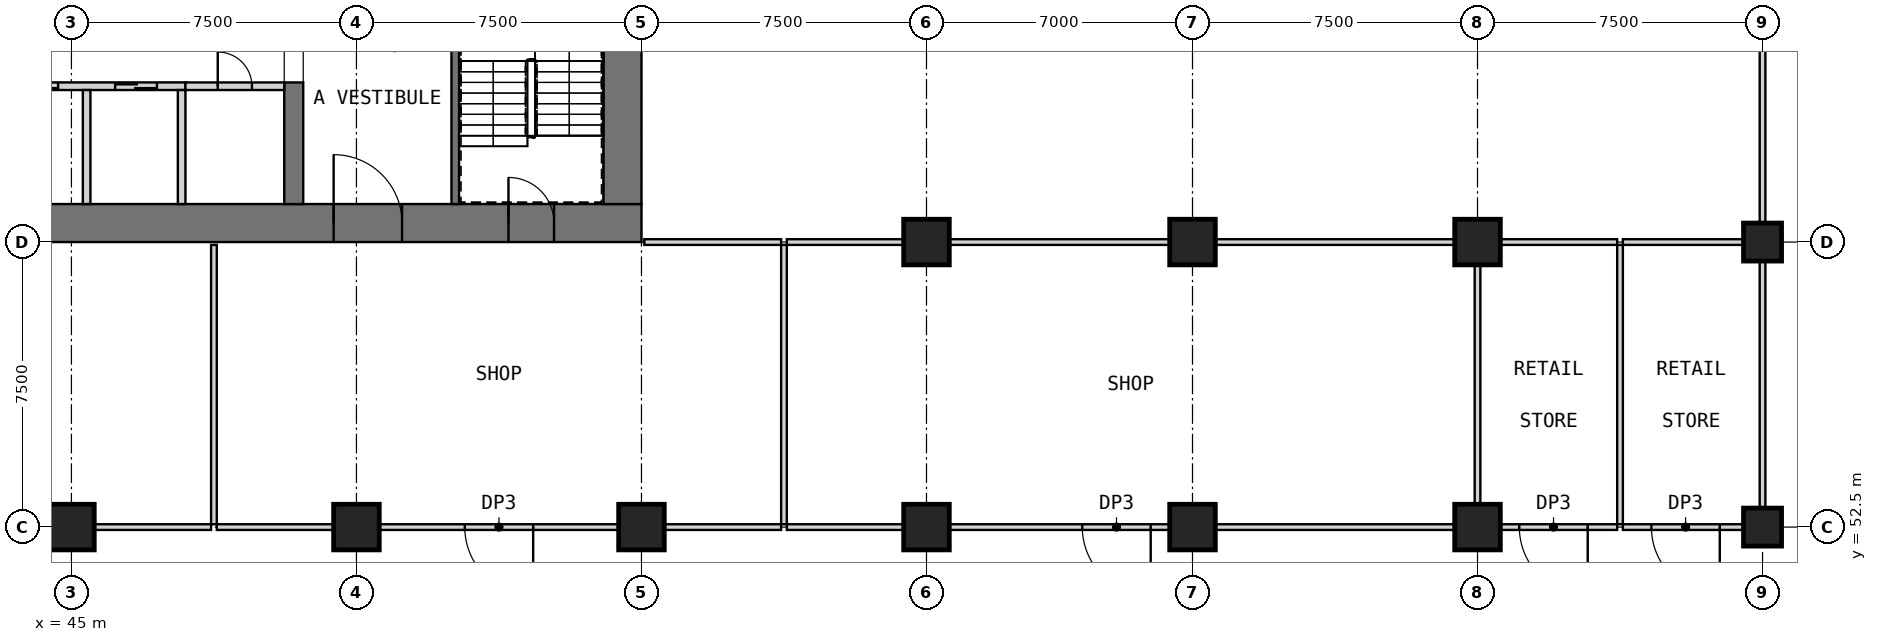
"""IFC4 building model, lengths in metres.
Left out: names, types, materials, properties, quantities, classifications, styles, units other than length and angle.
Written with IfcOpenShell. Run it as: python <this file> out.ifc"""

import sys

from ifc_helpers import new_model, si_unit, direction, frame, frame_2d, origin, origin_2d, place, context, subcontext, project, spatial, rectangle, extrude, element, fill, save


model = new_model("IFC4")
c1 = context("Model", 3, precision=1e-05, world=origin(), true_north=direction((0.0, 1.0)))
c2 = subcontext(c1, "Body", "Model", "MODEL_VIEW")
j1 = project(units=[si_unit("LENGTHUNIT", "METRE"), si_unit("PLANEANGLEUNIT", "RADIAN")], contexts=[c1])
p1 = place(None, origin())
s1 = spatial("IfcSite", under=j1, at=p1, CompositionType="ELEMENT")
p2 = place(p1, origin())
s2 = spatial("IfcBuilding", under=s1, at=p2, CompositionType="ELEMENT")
p3 = place(p2, frame((0.0, 0.0, 8.0)))
s3 = spatial("IfcBuildingStorey", under=s2, at=p3, CompositionType="ELEMENT", Elevation=8.0)
for number, where, z_axis, x_axis in (
    (1, (45.0, 52.5, 0.0), (0.0, 0.0, 1.0), (1.0, 0.0, 0.0)),
    (2, (52.5, 52.5, 0.0), (0.0, 0.0, 1.0), (1.0, 0.0, 0.0)),
    (3, (60.0, 52.5, 0.0), (0.0, 0.0, 1.0), (1.0, 0.0, 0.0)),
    (4, (67.5, 52.5, 0.0), (0.0, 0.0, 1.0), (1.0, 0.0, 0.0)),
    (5, (67.5, 60.0, 0.0), (0.0, 0.0, 1.0), (1.0, 0.0, 0.0)),
    (6, (74.5, 52.5, 0.0), (0.0, 0.0, 1.0), (1.0, 0.0, 0.0)),
    (7, (74.5, 60.0, 0.0), (0.0, 0.0, 1.0), (1.0, 0.0, 0.0)),
    (8, (82.0, 52.5, 0.0), (0.0, 0.0, 1.0), (1.0, 0.0, 0.0)),
    (9, (82.0, 60.0, 0.0), (0.0, 0.0, 1.0), (1.0, 0.0, 0.0)),
):
    element("IfcColumn", number, at=place(p3, frame(where, z_axis=z_axis, x_axis=x_axis)), inside=s3, PredefinedType="COLUMN", context=c2, shape_type="SweptSolid", body=[
        extrude(rectangle(XDim=1.2, YDim=1.2, at=origin_2d()), origin(), (0.0, 0.0, 1.0), 5.5),
    ])
for number, where, z_axis, x_axis in (
    (10, (89.5, 52.5, 0.0), (0.0, 0.0, 1.0), (1.0, 0.0, 0.0)),
    (11, (89.5, 60.0, 0.0), (0.0, 0.0, 1.0), (1.0, 0.0, 0.0)),
):
    element("IfcColumn", number, at=place(p3, frame(where, z_axis=z_axis, x_axis=x_axis)), inside=s3, PredefinedType="COLUMN", context=c2, shape_type="SweptSolid", body=[
        extrude(rectangle(XDim=1.0, YDim=1.0, at=origin_2d()), origin(), (0.0, 0.0, 1.0), 5.5),
    ])
p4 = place(p3, frame((30.0, 60.5, 0.0), z_axis=(0.0, 0.0, 1.0), x_axis=(1.0, 0.0, 0.0)))
e12 = element("IfcWall", 12, at=p4, inside=s3, PredefinedType="SHEAR", context=c2, shape_type="SweptSolid", body=[
    extrude(rectangle(XDim=30.0, YDim=1.0, at=frame_2d((15.0, 0.0))), origin(), (0.0, 0.0, 1.0), 5.5),
])
p5 = place(p4, frame((21.9, 0.0, 0.0)))
e13 = element("IfcOpeningElement", 13, at=p5, cuts=e12, PredefinedType="OPENING", context=c2, shape_type="SweptSolid", body=[
    extrude(rectangle(XDim=1.8, YDim=2.1, at=frame_2d((0.9, 1.05))), frame((0.0, 0.51, 0.0), z_axis=(0.0, -1.0, 0.0), x_axis=(1.0, 0.0, 0.0)), (0.0, 0.0, 1.0), 1.02),
])
p6 = place(p4, frame((26.5, 0.0, 0.0)))
e14 = element("IfcOpeningElement", 14, at=p6, cuts=e12, PredefinedType="OPENING", context=c2, shape_type="SweptSolid", body=[
    extrude(rectangle(XDim=1.2, YDim=2.1, at=frame_2d((0.6, 1.05))), frame((0.0, 0.51, 0.0), z_axis=(0.0, -1.0, 0.0), x_axis=(1.0, 0.0, 0.0)), (0.0, 0.0, 1.0), 1.02),
])
p7 = place(p3, frame((59.5, 61.0, 0.0), z_axis=(0.0, 0.0, 1.0), x_axis=(0.0, 1.0, 0.0)))
e15 = element("IfcWall", 15, at=p7, inside=s3, PredefinedType="SHEAR", context=c2, shape_type="SweptSolid", body=[
    extrude(rectangle(XDim=20.5, YDim=1.0, at=frame_2d((10.25, 0.0))), origin(), (0.0, 0.0, 1.0), 5.5),
])
p8 = place(p7, frame((14.5, 0.0, 0.0)))
e16 = element("IfcOpeningElement", 16, at=p8, cuts=e15, PredefinedType="OPENING", context=c2, shape_type="SweptSolid", body=[
    extrude(rectangle(XDim=1.8, YDim=2.1, at=frame_2d((0.9, 1.05))), frame((0.0, 0.51, 0.0), z_axis=(0.0, -1.0, 0.0), x_axis=(1.0, 0.0, 0.0)), (0.0, 0.0, 1.0), 1.02),
])
p9 = place(p3, frame((50.85, 61.0, 0.0), z_axis=(0.0, 0.0, 1.0), x_axis=(0.0, 1.0, 0.0)))
e17 = element("IfcWall", 17, at=p9, inside=s3, PredefinedType="SHEAR", context=c2, shape_type="SweptSolid", body=[
    extrude(rectangle(XDim=3.2, YDim=0.5, at=frame_2d((1.6, 0.0))), origin(), (0.0, 0.0, 1.0), 5.5),
])
p10 = place(p3, frame((35.0, 64.1, 0.0), z_axis=(0.0, 0.0, 1.0), x_axis=(1.0, 0.0, 0.0)))
e18 = element("IfcWall", 18, at=p10, inside=s3, PredefinedType="SOLIDWALL", context=c2, shape_type="SweptSolid", body=[
    extrude(rectangle(XDim=13.0, YDim=0.2, at=frame_2d((6.5, 0.0))), origin(), (0.0, 0.0, 1.0), 5.5),
])
p11 = place(p10, frame((0.75, 0.0, 0.0)))
e19 = element("IfcOpeningElement", 19, at=p11, cuts=e18, PredefinedType="OPENING", context=c2, shape_type="SweptSolid", body=[
    extrude(rectangle(XDim=1.1, YDim=2.1, at=frame_2d((0.55, 1.05))), frame((0.0, 0.11, 0.0), z_axis=(0.0, -1.0, 0.0), x_axis=(1.0, 0.0, 0.0)), (0.0, 0.0, 1.0), 0.22),
])
p12 = place(p10, frame((3.35, 0.0, 0.0)))
e20 = element("IfcOpeningElement", 20, at=p12, cuts=e18, PredefinedType="OPENING", context=c2, shape_type="SweptSolid", body=[
    extrude(rectangle(XDim=1.1, YDim=2.1, at=frame_2d((0.55, 1.05))), frame((0.0, 0.11, 0.0), z_axis=(0.0, -1.0, 0.0), x_axis=(1.0, 0.0, 0.0)), (0.0, 0.0, 1.0), 0.22),
])
p13 = place(p10, frame((5.95, 0.0, 0.0)))
e21 = element("IfcOpeningElement", 21, at=p13, cuts=e18, PredefinedType="OPENING", context=c2, shape_type="SweptSolid", body=[
    extrude(rectangle(XDim=1.1, YDim=2.1, at=frame_2d((0.55, 1.05))), frame((0.0, 0.11, 0.0), z_axis=(0.0, -1.0, 0.0), x_axis=(1.0, 0.0, 0.0)), (0.0, 0.0, 1.0), 0.22),
])
p14 = place(p10, frame((8.55, 0.0, 0.0)))
e22 = element("IfcOpeningElement", 22, at=p14, cuts=e18, PredefinedType="OPENING", context=c2, shape_type="SweptSolid", body=[
    extrude(rectangle(XDim=1.1, YDim=2.1, at=frame_2d((0.55, 1.05))), frame((0.0, 0.11, 0.0), z_axis=(0.0, -1.0, 0.0), x_axis=(1.0, 0.0, 0.0)), (0.0, 0.0, 1.0), 0.22),
])
p15 = place(p10, frame((11.15, 0.0, 0.0)))
e23 = element("IfcOpeningElement", 23, at=p15, cuts=e18, PredefinedType="OPENING", context=c2, shape_type="SweptSolid", body=[
    extrude(rectangle(XDim=1.1, YDim=2.1, at=frame_2d((0.55, 1.05))), frame((0.0, 0.11, 0.0), z_axis=(0.0, -1.0, 0.0), x_axis=(1.0, 0.0, 0.0)), (0.0, 0.0, 1.0), 0.22),
])
for number, where, z_axis, x_axis in (
    (24, (45.4, 61.0, 0.0), (0.0, 0.0, 1.0), (0.0, 1.0, 0.0)),
    (25, (47.9, 61.0, 0.0), (0.0, 0.0, 1.0), (0.0, 1.0, 0.0)),
):
    element("IfcWall", number, at=place(p3, frame(where, z_axis=z_axis, x_axis=x_axis)), inside=s3, PredefinedType="SOLIDWALL", context=c2, shape_type="SweptSolid", body=[
        extrude(rectangle(XDim=3.0, YDim=0.2, at=frame_2d((1.5, 0.0))), origin(), (0.0, 0.0, 1.0), 5.5),
    ])
p16 = place(p3, frame((48.0, 64.1, 0.0), z_axis=(0.0, 0.0, 1.0), x_axis=(1.0, 0.0, 0.0)))
e26 = element("IfcWall", 26, at=p16, inside=s3, PredefinedType="PARTITIONING", context=c2, shape_type="SweptSolid", body=[
    extrude(rectangle(XDim=2.6, YDim=0.2, at=frame_2d((1.3, 0.0))), origin(), (0.0, 0.0, 1.0), 5.2),
])
p17 = place(p16, frame((0.85, 0.0, 0.0)))
e27 = element("IfcOpeningElement", 27, at=p17, cuts=e26, PredefinedType="OPENING", context=c2, shape_type="SweptSolid", body=[
    extrude(rectangle(XDim=0.9, YDim=2.1, at=frame_2d((0.45, 1.05))), frame((0.0, 0.11, 0.0), z_axis=(0.0, -1.0, 0.0), x_axis=(1.0, 0.0, 0.0)), (0.0, 0.0, 1.0), 0.22),
])
p18 = place(p3, frame((55.1, 61.0, 0.0), z_axis=(0.0, 0.0, 1.0), x_axis=(0.0, 1.0, 0.0)))
e28 = element("IfcWall", 28, at=p18, inside=s3, PredefinedType="SOLIDWALL", context=c2, shape_type="SweptSolid", body=[
    extrude(rectangle(XDim=7.6, YDim=0.2, at=frame_2d((3.8, 0.0))), origin(), (0.0, 0.0, 1.0), 5.2),
])
for number, where, z_axis, x_axis in (
    (29, (45.6, 52.5, 0.0), (0.0, 0.0, 1.0), (1.0, 0.0, 0.0)),
    (30, (48.825, 52.5, 0.0), (0.0, 0.0, 1.0), (1.0, 0.0, 0.0)),
):
    element("IfcWall", number, at=place(p3, frame(where, z_axis=z_axis, x_axis=x_axis)), inside=s3, PredefinedType="PARTITIONING", context=c2, shape_type="SweptSolid", body=[
        extrude(rectangle(XDim=3.075, YDim=0.15, at=frame_2d((1.538, 0.0))), origin(), (0.0, 0.0, 1.0), 5.2),
    ])
p19 = place(p3, frame((59.4, 52.5, 0.0), z_axis=(0.0, 0.0, 1.0), x_axis=(-1.0, 0.0, 0.0)))
e31 = element("IfcWall", 31, at=p19, inside=s3, PredefinedType="PARTITIONING", context=c2, shape_type="SweptSolid", body=[
    extrude(rectangle(XDim=6.3, YDim=0.15, at=frame_2d((3.15, 0.0))), origin(), (0.0, 0.0, 1.0), 5.2),
])
p20 = place(p19, frame((2.25, 0.0, 0.0)))
e32 = element("IfcOpeningElement", 32, at=p20, cuts=e31, PredefinedType="OPENING", context=c2, shape_type="SweptSolid", body=[
    extrude(rectangle(XDim=1.8, YDim=2.4, at=frame_2d((0.9, 1.2))), frame((0.0, 0.085, 0.0), z_axis=(0.0, -1.0, 0.0), x_axis=(1.0, 0.0, 0.0)), (0.0, 0.0, 1.0), 0.17),
])
for number, where, z_axis, x_axis in (
    (33, (60.6, 52.5, 0.0), (0.0, 0.0, 1.0), (1.0, 0.0, 0.0)),
    (34, (63.825, 52.5, 0.0), (0.0, 0.0, 1.0), (1.0, 0.0, 0.0)),
):
    element("IfcWall", number, at=place(p3, frame(where, z_axis=z_axis, x_axis=x_axis)), inside=s3, PredefinedType="PARTITIONING", context=c2, shape_type="SweptSolid", body=[
        extrude(rectangle(XDim=3.075, YDim=0.15, at=frame_2d((1.538, 0.0))), origin(), (0.0, 0.0, 1.0), 5.2),
    ])
p21 = place(p3, frame((73.9, 52.5, 0.0), z_axis=(0.0, 0.0, 1.0), x_axis=(-1.0, 0.0, 0.0)))
e35 = element("IfcWall", 35, at=p21, inside=s3, PredefinedType="PARTITIONING", context=c2, shape_type="SweptSolid", body=[
    extrude(rectangle(XDim=5.8, YDim=0.15, at=frame_2d((2.9, 0.0))), origin(), (0.0, 0.0, 1.0), 5.2),
])
p22 = place(p21, frame((0.5, 0.0, 0.0)))
e36 = element("IfcOpeningElement", 36, at=p22, cuts=e35, PredefinedType="OPENING", context=c2, shape_type="SweptSolid", body=[
    extrude(rectangle(XDim=1.8, YDim=2.4, at=frame_2d((0.9, 1.2))), frame((0.0, 0.085, 0.0), z_axis=(0.0, -1.0, 0.0), x_axis=(1.0, 0.0, 0.0)), (0.0, 0.0, 1.0), 0.17),
])
p23 = place(p3, frame((75.1, 52.5, 0.0), z_axis=(0.0, 0.0, 1.0), x_axis=(1.0, 0.0, 0.0)))
e37 = element("IfcWall", 37, at=p23, inside=s3, PredefinedType="PARTITIONING", context=c2, shape_type="SweptSolid", body=[
    extrude(rectangle(XDim=6.3, YDim=0.15, at=frame_2d((3.15, 0.0))), origin(), (0.0, 0.0, 1.0), 5.2),
])
p24 = place(p3, frame((85.675, 52.5, 0.0), z_axis=(0.0, 0.0, 1.0), x_axis=(-1.0, 0.0, 0.0)))
e38 = element("IfcWall", 38, at=p24, inside=s3, PredefinedType="PARTITIONING", context=c2, shape_type="SweptSolid", body=[
    extrude(rectangle(XDim=3.075, YDim=0.15, at=frame_2d((1.538, 0.0))), origin(), (0.0, 0.0, 1.0), 5.2),
])
p25 = place(p24, frame((0.775, 0.0, 0.0)))
e39 = element("IfcOpeningElement", 39, at=p25, cuts=e38, PredefinedType="OPENING", context=c2, shape_type="SweptSolid", body=[
    extrude(rectangle(XDim=1.8, YDim=2.4, at=frame_2d((0.9, 1.2))), frame((0.0, 0.085, 0.0), z_axis=(0.0, -1.0, 0.0), x_axis=(1.0, 0.0, 0.0)), (0.0, 0.0, 1.0), 0.17),
])
p26 = place(p3, frame((89.0, 52.5, 0.0), z_axis=(0.0, 0.0, 1.0), x_axis=(-1.0, 0.0, 0.0)))
e40 = element("IfcWall", 40, at=p26, inside=s3, PredefinedType="PARTITIONING", context=c2, shape_type="SweptSolid", body=[
    extrude(rectangle(XDim=3.175, YDim=0.15, at=frame_2d((1.587, 0.0))), origin(), (0.0, 0.0, 1.0), 5.2),
])
p27 = place(p26, frame((0.625, 0.0, 0.0)))
e41 = element("IfcOpeningElement", 41, at=p27, cuts=e40, PredefinedType="OPENING", context=c2, shape_type="SweptSolid", body=[
    extrude(rectangle(XDim=1.8, YDim=2.4, at=frame_2d((0.9, 1.2))), frame((0.0, 0.085, 0.0), z_axis=(0.0, -1.0, 0.0), x_axis=(1.0, 0.0, 0.0)), (0.0, 0.0, 1.0), 0.17),
])
p28 = place(p3, frame((60.075, 60.0, 0.0), z_axis=(0.0, 0.0, 1.0), x_axis=(1.0, 0.0, 0.0)))
e42 = element("IfcWall", 42, at=p28, inside=s3, PredefinedType="PARTITIONING", context=c2, shape_type="SweptSolid", body=[
    extrude(rectangle(XDim=3.6, YDim=0.15, at=frame_2d((1.8, 0.0))), origin(), (0.0, 0.0, 1.0), 5.2),
])
p29 = place(p3, frame((63.825, 60.0, 0.0), z_axis=(0.0, 0.0, 1.0), x_axis=(1.0, 0.0, 0.0)))
e43 = element("IfcWall", 43, at=p29, inside=s3, PredefinedType="PARTITIONING", context=c2, shape_type="SweptSolid", body=[
    extrude(rectangle(XDim=3.075, YDim=0.15, at=frame_2d((1.538, 0.0))), origin(), (0.0, 0.0, 1.0), 5.2),
])
p30 = place(p3, frame((68.1, 60.0, 0.0), z_axis=(0.0, 0.0, 1.0), x_axis=(1.0, 0.0, 0.0)))
e44 = element("IfcWall", 44, at=p30, inside=s3, PredefinedType="PARTITIONING", context=c2, shape_type="SweptSolid", body=[
    extrude(rectangle(XDim=5.8, YDim=0.15, at=frame_2d((2.9, 0.0))), origin(), (0.0, 0.0, 1.0), 5.2),
])
p31 = place(p3, frame((75.1, 60.0, 0.0), z_axis=(0.0, 0.0, 1.0), x_axis=(1.0, 0.0, 0.0)))
e45 = element("IfcWall", 45, at=p31, inside=s3, PredefinedType="PARTITIONING", context=c2, shape_type="SweptSolid", body=[
    extrude(rectangle(XDim=6.3, YDim=0.15, at=frame_2d((3.15, 0.0))), origin(), (0.0, 0.0, 1.0), 5.2),
])
p32 = place(p3, frame((82.6, 60.0, 0.0), z_axis=(0.0, 0.0, 1.0), x_axis=(1.0, 0.0, 0.0)))
e46 = element("IfcWall", 46, at=p32, inside=s3, PredefinedType="PARTITIONING", context=c2, shape_type="SweptSolid", body=[
    extrude(rectangle(XDim=3.075, YDim=0.15, at=frame_2d((1.538, 0.0))), origin(), (0.0, 0.0, 1.0), 5.2),
])
p33 = place(p3, frame((85.825, 60.0, 0.0), z_axis=(0.0, 0.0, 1.0), x_axis=(1.0, 0.0, 0.0)))
e47 = element("IfcWall", 47, at=p33, inside=s3, PredefinedType="PARTITIONING", context=c2, shape_type="SweptSolid", body=[
    extrude(rectangle(XDim=3.175, YDim=0.15, at=frame_2d((1.587, 0.0))), origin(), (0.0, 0.0, 1.0), 5.2),
])
p34 = place(p3, frame((63.75, 52.575, 0.0), z_axis=(0.0, 0.0, 1.0), x_axis=(0.0, 1.0, 0.0)))
e48 = element("IfcWall", 48, at=p34, inside=s3, PredefinedType="PARTITIONING", context=c2, shape_type="SweptSolid", body=[
    extrude(rectangle(XDim=7.35, YDim=0.15, at=frame_2d((3.675, 0.0))), origin(), (0.0, 0.0, 1.0), 5.2),
])
for number, where, z_axis, x_axis in (
    (49, (89.5, 53.0, 0.0), (0.0, 0.0, 1.0), (0.0, 1.0, 0.0)),
    (50, (89.5, 60.5, 0.0), (0.0, 0.0, 1.0), (0.0, 1.0, 0.0)),
):
    element("IfcWall", number, at=place(p3, frame(where, z_axis=z_axis, x_axis=x_axis)), inside=s3, PredefinedType="PARTITIONING", context=c2, shape_type="SweptSolid", body=[
        extrude(rectangle(XDim=6.5, YDim=0.15, at=frame_2d((3.25, 0.0))), origin(), (0.0, 0.0, 1.0), 5.2),
    ])
p35 = place(p3, frame((48.75, 52.575, 0.0), z_axis=(0.0, 0.0, 1.0), x_axis=(0.0, 1.0, 0.0)))
e51 = element("IfcWall", 51, at=p35, inside=s3, PredefinedType="PARTITIONING", context=c2, shape_type="SweptSolid", body=[
    extrude(rectangle(XDim=7.35, YDim=0.15, at=frame_2d((3.675, 0.0))), origin(), (0.0, 0.0, 1.0), 5.2),
])
p36 = place(p3, frame((82.0, 53.1, 0.0), z_axis=(0.0, 0.0, 1.0), x_axis=(0.0, 1.0, 0.0)))
e52 = element("IfcWall", 52, at=p36, inside=s3, PredefinedType="PARTITIONING", context=c2, shape_type="SweptSolid", body=[
    extrude(rectangle(XDim=6.3, YDim=0.15, at=frame_2d((3.15, 0.0))), origin(), (0.0, 0.0, 1.0), 5.2),
])
p37 = place(p3, frame((85.75, 52.575, 0.0), z_axis=(0.0, 0.0, 1.0), x_axis=(0.0, 1.0, 0.0)))
e53 = element("IfcWall", 53, at=p37, inside=s3, PredefinedType="PARTITIONING", context=c2, shape_type="SweptSolid", body=[
    extrude(rectangle(XDim=7.35, YDim=0.15, at=frame_2d((3.675, 0.0))), origin(), (0.0, 0.0, 1.0), 5.2),
])
p38 = place(p14, origin())
e54 = element("IfcDoor", 54, at=p38, inside=s3, OperationType="DOUBLE_DOOR_SLIDING", PredefinedType="DOOR", context=c2, shape_type="SweptSolid", body=[
    extrude(rectangle(XDim=1.1, YDim=2.1, at=frame_2d((0.55, 1.05))), frame((0.0, 0.025, 0.0), z_axis=(0.0, -1.0, 0.0), x_axis=(1.0, 0.0, 0.0)), (0.0, 0.0, 1.0), 0.05),
])
fill(e22, e54)
p39 = place(p15, origin())
e55 = element("IfcDoor", 55, at=p39, inside=s3, OperationType="DOUBLE_DOOR_SLIDING", PredefinedType="DOOR", context=c2, shape_type="SweptSolid", body=[
    extrude(rectangle(XDim=1.1, YDim=2.1, at=frame_2d((0.55, 1.05))), frame((0.0, 0.025, 0.0), z_axis=(0.0, -1.0, 0.0), x_axis=(1.0, 0.0, 0.0)), (0.0, 0.0, 1.0), 0.05),
])
fill(e23, e55)
p40 = place(p17, origin())
e56 = element("IfcDoor", 56, at=p40, inside=s3, OperationType="SINGLE_SWING_LEFT", PredefinedType="DOOR", context=c2, shape_type="SweptSolid", body=[
    extrude(rectangle(XDim=0.9, YDim=2.1, at=frame_2d((0.45, 1.05))), frame((0.0, 0.025, 0.0), z_axis=(0.0, -1.0, 0.0), x_axis=(1.0, 0.0, 0.0)), (0.0, 0.0, 1.0), 0.05),
])
fill(e27, e56)
p41 = place(p5, origin())
e57 = element("IfcDoor", 57, at=p41, inside=s3, OperationType="DOUBLE_DOOR_SINGLE_SWING", PredefinedType="DOOR", context=c2, shape_type="SweptSolid", body=[
    extrude(rectangle(XDim=1.8, YDim=2.1, at=frame_2d((0.9, 1.05))), frame((0.0, 0.025, 0.0), z_axis=(0.0, -1.0, 0.0), x_axis=(1.0, 0.0, 0.0)), (0.0, 0.0, 1.0), 0.05),
])
fill(e13, e57)
p42 = place(p6, origin())
e58 = element("IfcDoor", 58, at=p42, inside=s3, OperationType="SINGLE_SWING_LEFT", PredefinedType="DOOR", context=c2, shape_type="SweptSolid", body=[
    extrude(rectangle(XDim=1.2, YDim=2.1, at=frame_2d((0.6, 1.05))), frame((0.0, 0.025, 0.0), z_axis=(0.0, -1.0, 0.0), x_axis=(1.0, 0.0, 0.0)), (0.0, 0.0, 1.0), 0.05),
])
fill(e14, e58)
p43 = place(p20, origin())
e59 = element("IfcDoor", 59, at=p43, inside=s3, OperationType="SINGLE_SWING_LEFT", PredefinedType="DOOR", context=c2, shape_type="SweptSolid", body=[
    extrude(rectangle(XDim=1.8, YDim=2.4, at=frame_2d((0.9, 1.2))), frame((0.0, 0.025, 0.0), z_axis=(0.0, -1.0, 0.0), x_axis=(1.0, 0.0, 0.0)), (0.0, 0.0, 1.0), 0.05),
])
fill(e32, e59)
p44 = place(p22, origin())
e60 = element("IfcDoor", 60, at=p44, inside=s3, OperationType="SINGLE_SWING_LEFT", PredefinedType="DOOR", context=c2, shape_type="SweptSolid", body=[
    extrude(rectangle(XDim=1.8, YDim=2.4, at=frame_2d((0.9, 1.2))), frame((0.0, 0.025, 0.0), z_axis=(0.0, -1.0, 0.0), x_axis=(1.0, 0.0, 0.0)), (0.0, 0.0, 1.0), 0.05),
])
fill(e36, e60)
p45 = place(p25, origin())
e61 = element("IfcDoor", 61, at=p45, inside=s3, OperationType="SINGLE_SWING_LEFT", PredefinedType="DOOR", context=c2, shape_type="SweptSolid", body=[
    extrude(rectangle(XDim=1.8, YDim=2.4, at=frame_2d((0.9, 1.2))), frame((0.0, 0.025, 0.0), z_axis=(0.0, -1.0, 0.0), x_axis=(1.0, 0.0, 0.0)), (0.0, 0.0, 1.0), 0.05),
])
fill(e39, e61)
p46 = place(p27, origin())
e62 = element("IfcDoor", 62, at=p46, inside=s3, OperationType="SINGLE_SWING_LEFT", PredefinedType="DOOR", context=c2, shape_type="SweptSolid", body=[
    extrude(rectangle(XDim=1.8, YDim=2.4, at=frame_2d((0.9, 1.2))), frame((0.0, 0.025, 0.0), z_axis=(0.0, -1.0, 0.0), x_axis=(1.0, 0.0, 0.0)), (0.0, 0.0, 1.0), 0.05),
])
fill(e41, e62)
save(model, sys.argv[1])
